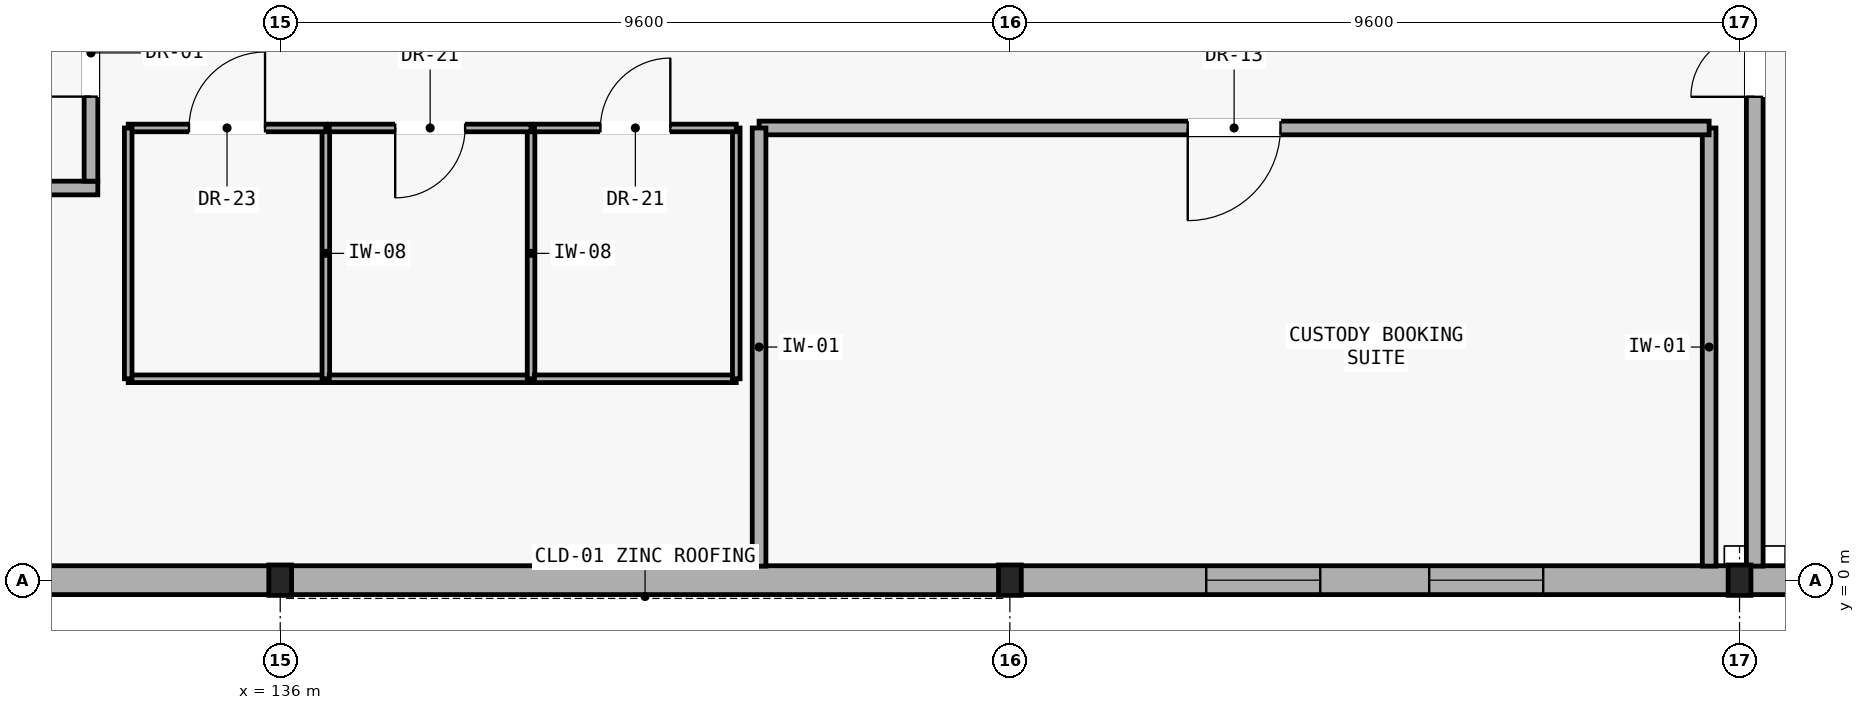
"""IFC4 building model, lengths in metres.
Left out: names, types, materials, properties, quantities, classifications, styles, units other than length and angle.
Written with IfcOpenShell. Run it as: python <this file> out.ifc"""

import sys

from ifc_helpers import new_model, si_unit, direction, frame, frame_2d, origin, origin_2d, place, context, subcontext, project, spatial, rectangle, i_section, extrude, element, fill, save


model = new_model("IFC4")
c1 = context("Model", 3, precision=1e-05, world=origin(), true_north=direction((0.0, 1.0)))
c2 = subcontext(c1, "Body", "Model", "MODEL_VIEW")
j1 = project(units=[si_unit("LENGTHUNIT", "METRE"), si_unit("PLANEANGLEUNIT", "RADIAN")], contexts=[c1])
p1 = place(None, origin())
s1 = spatial("IfcSite", under=j1, at=p1, CompositionType="ELEMENT")
p2 = place(p1, origin())
s2 = spatial("IfcBuilding", under=s1, at=p2, CompositionType="ELEMENT")
p3 = place(p2, origin())
s3 = spatial("IfcBuildingStorey", under=s2, at=p3, CompositionType="ELEMENT", Elevation=0.0)
for number, where, z_axis, x_axis in (
    (1, (136.0, 0.0, -0.27), (0.0, 0.0, 1.0), (1.0, 0.0, 0.0)),
    (2, (145.6, 0.0, -0.27), (0.0, 0.0, 1.0), (1.0, 0.0, 0.0)),
    (3, (155.2, 0.0, -0.27), (0.0, 0.0, 1.0), (1.0, 0.0, 0.0)),
):
    element("IfcColumn", number, at=place(p3, frame(where, z_axis=z_axis, x_axis=x_axis)), inside=s3, PredefinedType="COLUMN", context=c2, shape_type="SweptSolid", body=[
        extrude(i_section(OverallWidth=0.3, OverallDepth=0.4, WebThickness=0.013, FlangeThickness=0.024, FilletRadius=0.027, at=origin_2d()), origin(), (0.0, 0.0, 1.0), 5.52),
    ])
p4 = place(p3, frame((126.409, 0.0, 0.0), z_axis=(0.0, 0.0, 1.0), x_axis=(1.0, 0.0, 0.0)))
e4 = element("IfcWall", 4, at=p4, inside=s3, PredefinedType="SOLIDWALL", context=c2, shape_type="SweptSolid", body=[
    extrude(rectangle(XDim=9.583, YDim=0.38, at=frame_2d((4.791, 0.0))), origin(), (0.0, 0.0, 1.0), 4.67),
])
p5 = place(p4, frame((3.891, 0.0, 0.0)))
e5 = element("IfcOpeningElement", 5, at=p5, cuts=e4, PredefinedType="OPENING", context=c2, shape_type="SweptSolid", body=[
    extrude(rectangle(XDim=1.8, YDim=2.2, at=frame_2d((0.9, 1.1))), frame((0.0, 0.2, 0.0), z_axis=(0.0, -1.0, 0.0), x_axis=(1.0, 0.0, 0.0)), (0.0, 0.0, 1.0), 0.4),
])
p6 = place(p3, frame((136.009, 0.0, 0.0), z_axis=(0.0, 0.0, 1.0), x_axis=(1.0, 0.0, 0.0)))
e6 = element("IfcWall", 6, at=p6, inside=s3, PredefinedType="SOLIDWALL", context=c2, shape_type="SweptSolid", body=[
    extrude(rectangle(XDim=9.583, YDim=0.38, at=frame_2d((4.791, 0.0))), origin(), (0.0, 0.0, 1.0), 4.67),
])
p7 = place(p3, frame((145.609, 0.0, 0.0), z_axis=(0.0, 0.0, 1.0), x_axis=(1.0, 0.0, 0.0)))
e7 = element("IfcWall", 7, at=p7, inside=s3, PredefinedType="SOLIDWALL", context=c2, shape_type="SweptSolid", body=[
    extrude(rectangle(XDim=9.583, YDim=0.38, at=frame_2d((4.791, 0.0))), origin(), (0.0, 0.0, 1.0), 4.67),
])
p8 = place(p7, frame((2.575, 0.0, 1.7)))
e8 = element("IfcOpeningElement", 8, at=p8, cuts=e7, PredefinedType="OPENING", context=c2, shape_type="SweptSolid", body=[
    extrude(rectangle(XDim=1.5, YDim=0.7, at=frame_2d((0.75, 0.35))), frame((0.0, 0.2, 0.0), z_axis=(0.0, -1.0, 0.0), x_axis=(1.0, 0.0, 0.0)), (0.0, 0.0, 1.0), 0.4),
])
p9 = place(p7, frame((5.508, 0.0, 1.7)))
e9 = element("IfcOpeningElement", 9, at=p9, cuts=e7, PredefinedType="OPENING", context=c2, shape_type="SweptSolid", body=[
    extrude(rectangle(XDim=1.5, YDim=0.7, at=frame_2d((0.75, 0.35))), frame((0.0, 0.2, 0.0), z_axis=(0.0, -1.0, 0.0), x_axis=(1.0, 0.0, 0.0)), (0.0, 0.0, 1.0), 0.4),
])
p10 = place(p3, frame((155.209, 0.0, 0.0), z_axis=(0.0, 0.0, 1.0), x_axis=(1.0, 0.0, 0.0)))
e10 = element("IfcWall", 10, at=p10, inside=s3, PredefinedType="SOLIDWALL", context=c2, shape_type="SweptSolid", body=[
    extrude(rectangle(XDim=15.982, YDim=0.38, at=frame_2d((7.991, 0.0))), origin(), (0.0, 0.0, 1.0), 4.44),
])
p11 = place(p10, frame((5.591, 0.0, 0.0)))
e11 = element("IfcOpeningElement", 11, at=p11, cuts=e10, PredefinedType="OPENING", context=c2, shape_type="SweptSolid", body=[
    extrude(rectangle(XDim=4.8, YDim=3.1, at=frame_2d((2.4, 1.55))), frame((0.0, 0.2, 0.0), z_axis=(0.0, -1.0, 0.0), x_axis=(1.0, 0.0, 0.0)), (0.0, 0.0, 1.0), 0.4),
])
p12 = place(p3, frame((127.2, 5.16, 0.0), z_axis=(0.0, 0.0, 1.0), x_axis=(1.0, 0.0, 0.0)))
e12 = element("IfcWall", 12, at=p12, inside=s3, PredefinedType="PARTITIONING", context=c2, shape_type="SweptSolid", body=[
    extrude(rectangle(XDim=6.4, YDim=0.18, at=frame_2d((3.2, 0.0))), origin(), (0.0, 0.0, 1.0), 5.0),
])
p13 = place(p3, frame((133.51, 5.25, 0.0), z_axis=(0.0, 0.0, 1.0), x_axis=(0.0, 1.0, 0.0)))
e13 = element("IfcWall", 13, at=p13, inside=s3, PredefinedType="PARTITIONING", context=c2, shape_type="SweptSolid", body=[
    extrude(rectangle(XDim=3.375, YDim=0.18, at=frame_2d((1.688, 0.0))), origin(), (0.0, 0.0, 1.0), 5.0),
])
p14 = place(p13, frame((1.113, 0.0, 0.0)))
e14 = element("IfcOpeningElement", 14, at=p14, cuts=e13, PredefinedType="OPENING", context=c2, shape_type="SweptSolid", body=[
    extrude(rectangle(XDim=1.15, YDim=2.15, at=frame_2d((0.575, 1.075))), frame((0.0, 0.1, 0.0), z_axis=(0.0, -1.0, 0.0), x_axis=(1.0, 0.0, 0.0)), (0.0, 0.0, 1.0), 0.2),
])
p15 = place(p3, frame((155.4, 22.215, 0.0), z_axis=(0.0, 0.0, 1.0), x_axis=(0.0, -1.0, 0.0)))
e15 = element("IfcWall", 15, at=p15, inside=s3, PredefinedType="PARTITIONING", context=c2, shape_type="SweptSolid", body=[
    extrude(rectangle(XDim=22.03, YDim=0.22, at=frame_2d((11.015, 0.0))), origin(), (0.0, 0.0, 1.0), 4.54),
])
p16 = place(p15, frame((14.175, 0.0, 0.0)))
e16 = element("IfcOpeningElement", 16, at=p16, cuts=e15, PredefinedType="OPENING", context=c2, shape_type="SweptSolid", body=[
    extrude(rectangle(XDim=1.68, YDim=2.2, at=frame_2d((0.84, 1.1))), frame((0.0, 0.12, 0.0), z_axis=(0.0, -1.0, 0.0), x_axis=(1.0, 0.0, 0.0)), (0.0, 0.0, 1.0), 0.24),
])
p17 = place(p3, frame((154.8, 0.185, 0.0), z_axis=(0.0, 0.0, 1.0), x_axis=(0.0, 1.0, 0.0)))
e17 = element("IfcWall", 17, at=p17, inside=s3, PredefinedType="PARTITIONING", context=c2, shape_type="SweptSolid", body=[
    extrude(rectangle(XDim=5.765, YDim=0.18, at=frame_2d((2.882, 0.0))), origin(), (0.0, 0.0, 1.0), 5.0),
])
p18 = place(p3, frame((154.8, 5.95, 0.0), z_axis=(0.0, 0.0, 1.0), x_axis=(-1.0, 0.0, 0.0)))
e18 = element("IfcWall", 18, at=p18, inside=s3, PredefinedType="PARTITIONING", context=c2, shape_type="SweptSolid", body=[
    extrude(rectangle(XDim=12.5, YDim=0.18, at=frame_2d((6.25, 0.0))), origin(), (0.0, 0.0, 1.0), 5.0),
])
p19 = place(p18, frame((5.64, 0.0, 0.0)))
e19 = element("IfcOpeningElement", 19, at=p19, cuts=e18, PredefinedType="OPENING", context=c2, shape_type="SweptSolid", body=[
    extrude(rectangle(XDim=1.22, YDim=2.1, at=frame_2d((0.61, 1.05))), frame((0.0, 0.1, 0.0), z_axis=(0.0, -1.0, 0.0), x_axis=(1.0, 0.0, 0.0)), (0.0, 0.0, 1.0), 0.2),
])
p20 = place(p3, frame((142.3, 5.95, 0.0), z_axis=(0.0, 0.0, 1.0), x_axis=(0.0, -1.0, 0.0)))
e20 = element("IfcWall", 20, at=p20, inside=s3, PredefinedType="PARTITIONING", context=c2, shape_type="SweptSolid", body=[
    extrude(rectangle(XDim=5.765, YDim=0.18, at=frame_2d((2.882, 0.0))), origin(), (0.0, 0.0, 1.0), 5.0),
])
p21 = place(p3, frame((134.0, 2.65, 0.0), z_axis=(0.0, 0.0, 1.0), x_axis=(1.0, 0.0, 0.0)))
e21 = element("IfcWall", 21, at=p21, inside=s3, PredefinedType="PARTITIONING", context=c2, shape_type="SweptSolid", body=[
    extrude(rectangle(XDim=2.6, YDim=0.1, at=frame_2d((1.3, 0.0))), origin(), (0.0, 0.0, 1.0), 5.0),
])
p22 = place(p3, frame((136.6, 2.65, 0.0), z_axis=(0.0, 0.0, 1.0), x_axis=(0.0, 1.0, 0.0)))
e22 = element("IfcWall", 22, at=p22, inside=s3, PredefinedType="PARTITIONING", context=c2, shape_type="SweptSolid", body=[
    extrude(rectangle(XDim=3.3, YDim=0.1, at=frame_2d((1.65, 0.0))), origin(), (0.0, 0.0, 1.0), 5.0),
])
p23 = place(p3, frame((136.6, 5.95, 0.0), z_axis=(0.0, 0.0, 1.0), x_axis=(-1.0, 0.0, 0.0)))
e23 = element("IfcWall", 23, at=p23, inside=s3, PredefinedType="PARTITIONING", context=c2, shape_type="SweptSolid", body=[
    extrude(rectangle(XDim=2.6, YDim=0.1, at=frame_2d((1.3, 0.0))), origin(), (0.0, 0.0, 1.0), 5.0),
])
p24 = place(p23, frame((0.8, 0.0, 0.0)))
e24 = element("IfcOpeningElement", 24, at=p24, cuts=e23, PredefinedType="OPENING", context=c2, shape_type="SweptSolid", body=[
    extrude(rectangle(XDim=1.0, YDim=2.08, at=frame_2d((0.5, 1.04))), frame((0.0, 0.06, 0.0), z_axis=(0.0, -1.0, 0.0), x_axis=(1.0, 0.0, 0.0)), (0.0, 0.0, 1.0), 0.12),
])
p25 = place(p3, frame((134.0, 5.95, 0.0), z_axis=(0.0, 0.0, 1.0), x_axis=(0.0, -1.0, 0.0)))
e25 = element("IfcWall", 25, at=p25, inside=s3, PredefinedType="PARTITIONING", context=c2, shape_type="SweptSolid", body=[
    extrude(rectangle(XDim=3.3, YDim=0.1, at=frame_2d((1.65, 0.0))), origin(), (0.0, 0.0, 1.0), 5.0),
])
p26 = place(p3, frame((136.645, 2.65, 0.0), z_axis=(0.0, 0.0, 1.0), x_axis=(1.0, 0.0, 0.0)))
e26 = element("IfcWall", 26, at=p26, inside=s3, PredefinedType="PARTITIONING", context=c2, shape_type="SweptSolid", body=[
    extrude(rectangle(XDim=2.655, YDim=0.1, at=frame_2d((1.328, 0.0))), origin(), (0.0, 0.0, 1.0), 5.0),
])
p27 = place(p3, frame((139.3, 2.65, 0.0), z_axis=(0.0, 0.0, 1.0), x_axis=(0.0, 1.0, 0.0)))
e27 = element("IfcWall", 27, at=p27, inside=s3, PredefinedType="PARTITIONING", context=c2, shape_type="SweptSolid", body=[
    extrude(rectangle(XDim=3.3, YDim=0.1, at=frame_2d((1.65, 0.0))), origin(), (0.0, 0.0, 1.0), 5.0),
])
p28 = place(p3, frame((139.3, 5.95, 0.0), z_axis=(0.0, 0.0, 1.0), x_axis=(-1.0, 0.0, 0.0)))
e28 = element("IfcWall", 28, at=p28, inside=s3, PredefinedType="PARTITIONING", context=c2, shape_type="SweptSolid", body=[
    extrude(rectangle(XDim=2.655, YDim=0.1, at=frame_2d((1.328, 0.0))), origin(), (0.0, 0.0, 1.0), 5.0),
])
p29 = place(p28, frame((0.867, 0.0, 0.0)))
e29 = element("IfcOpeningElement", 29, at=p29, cuts=e28, PredefinedType="OPENING", context=c2, shape_type="SweptSolid", body=[
    extrude(rectangle(XDim=0.92, YDim=2.08, at=frame_2d((0.46, 1.04))), frame((0.0, 0.06, 0.0), z_axis=(0.0, -1.0, 0.0), x_axis=(1.0, 0.0, 0.0)), (0.0, 0.0, 1.0), 0.12),
])
p30 = place(p3, frame((139.345, 2.65, 0.0), z_axis=(0.0, 0.0, 1.0), x_axis=(1.0, 0.0, 0.0)))
e30 = element("IfcWall", 30, at=p30, inside=s3, PredefinedType="PARTITIONING", context=c2, shape_type="SweptSolid", body=[
    extrude(rectangle(XDim=2.655, YDim=0.1, at=frame_2d((1.328, 0.0))), origin(), (0.0, 0.0, 1.0), 5.0),
])
p31 = place(p3, frame((142.0, 2.65, 0.0), z_axis=(0.0, 0.0, 1.0), x_axis=(0.0, 1.0, 0.0)))
e31 = element("IfcWall", 31, at=p31, inside=s3, PredefinedType="PARTITIONING", context=c2, shape_type="SweptSolid", body=[
    extrude(rectangle(XDim=3.3, YDim=0.1, at=frame_2d((1.65, 0.0))), origin(), (0.0, 0.0, 1.0), 5.0),
])
p32 = place(p3, frame((142.0, 5.95, 0.0), z_axis=(0.0, 0.0, 1.0), x_axis=(-1.0, 0.0, 0.0)))
e32 = element("IfcWall", 32, at=p32, inside=s3, PredefinedType="PARTITIONING", context=c2, shape_type="SweptSolid", body=[
    extrude(rectangle(XDim=2.655, YDim=0.1, at=frame_2d((1.328, 0.0))), origin(), (0.0, 0.0, 1.0), 5.0),
])
p33 = place(p32, frame((0.867, 0.0, 0.0)))
e33 = element("IfcOpeningElement", 33, at=p33, cuts=e32, PredefinedType="OPENING", context=c2, shape_type="SweptSolid", body=[
    extrude(rectangle(XDim=0.92, YDim=2.08, at=frame_2d((0.46, 1.04))), frame((0.0, 0.06, 0.0), z_axis=(0.0, -1.0, 0.0), x_axis=(1.0, 0.0, 0.0)), (0.0, 0.0, 1.0), 0.12),
])
p34 = place(p8, origin())
e34 = element("IfcWindow", 34, at=p34, inside=s3, PartitioningType="SINGLE_PANEL", PredefinedType="WINDOW", context=c2, shape_type="SweptSolid", body=[
    extrude(rectangle(XDim=1.5, YDim=0.7, at=frame_2d((0.75, 0.35))), frame((0.0, 0.03, 0.0), z_axis=(0.0, -1.0, 0.0), x_axis=(1.0, 0.0, 0.0)), (0.0, 0.0, 1.0), 0.06),
])
fill(e8, e34)
p35 = place(p9, origin())
e35 = element("IfcWindow", 35, at=p35, inside=s3, PartitioningType="SINGLE_PANEL", PredefinedType="WINDOW", context=c2, shape_type="SweptSolid", body=[
    extrude(rectangle(XDim=1.5, YDim=0.7, at=frame_2d((0.75, 0.35))), frame((0.0, 0.03, 0.0), z_axis=(0.0, -1.0, 0.0), x_axis=(1.0, 0.0, 0.0)), (0.0, 0.0, 1.0), 0.06),
])
fill(e9, e35)
p36 = place(p14, origin())
e36 = element("IfcDoor", 36, at=p36, inside=s3, OperationType="SINGLE_SWING_LEFT", PredefinedType="DOOR", context=c2, shape_type="SweptSolid", body=[
    extrude(rectangle(XDim=1.15, YDim=2.15, at=frame_2d((0.575, 1.075))), frame((0.0, 0.025, 0.0), z_axis=(0.0, -1.0, 0.0), x_axis=(1.0, 0.0, 0.0)), (0.0, 0.0, 1.0), 0.05),
])
fill(e14, e36)
p37 = place(p16, frame((1.68, 0.0, 0.0), z_axis=(0.0, 0.0, 1.0), x_axis=(-1.0, 0.0, 0.0)))
e37 = element("IfcDoor", 37, at=p37, inside=s3, OperationType="DOUBLE_DOOR_SINGLE_SWING", PredefinedType="DOOR", context=c2, shape_type="SweptSolid", body=[
    extrude(rectangle(XDim=1.68, YDim=2.2, at=frame_2d((0.84, 1.1))), frame((0.0, 0.025, 0.0), z_axis=(0.0, -1.0, 0.0), x_axis=(1.0, 0.0, 0.0)), (0.0, 0.0, 1.0), 0.05),
])
fill(e16, e37)
p38 = place(p19, origin())
e38 = element("IfcDoor", 38, at=p38, inside=s3, OperationType="SINGLE_SWING_RIGHT", PredefinedType="DOOR", context=c2, shape_type="SweptSolid", body=[
    extrude(rectangle(XDim=1.22, YDim=2.1, at=frame_2d((0.61, 1.05))), frame((0.0, 0.025, 0.0), z_axis=(0.0, -1.0, 0.0), x_axis=(1.0, 0.0, 0.0)), (0.0, 0.0, 1.0), 0.05),
])
fill(e19, e38)
p39 = place(p24, frame((1.0, 0.0, 0.0), z_axis=(0.0, 0.0, 1.0), x_axis=(-1.0, 0.0, 0.0)))
e39 = element("IfcDoor", 39, at=p39, inside=s3, OperationType="SINGLE_SWING_LEFT", PredefinedType="DOOR", context=c2, shape_type="SweptSolid", body=[
    extrude(rectangle(XDim=1.0, YDim=2.08, at=frame_2d((0.5, 1.04))), frame((0.0, 0.025, 0.0), z_axis=(0.0, -1.0, 0.0), x_axis=(1.0, 0.0, 0.0)), (0.0, 0.0, 1.0), 0.05),
])
fill(e24, e39)
p40 = place(p29, origin())
e40 = element("IfcDoor", 40, at=p40, inside=s3, OperationType="SINGLE_SWING_RIGHT", PredefinedType="DOOR", context=c2, shape_type="SweptSolid", body=[
    extrude(rectangle(XDim=0.92, YDim=2.08, at=frame_2d((0.46, 1.04))), frame((0.0, 0.025, 0.0), z_axis=(0.0, -1.0, 0.0), x_axis=(1.0, 0.0, 0.0)), (0.0, 0.0, 1.0), 0.05),
])
fill(e29, e40)
p41 = place(p33, frame((0.92, 0.0, 0.0), z_axis=(0.0, 0.0, 1.0), x_axis=(-1.0, 0.0, 0.0)))
e41 = element("IfcDoor", 41, at=p41, inside=s3, OperationType="SINGLE_SWING_LEFT", PredefinedType="DOOR", context=c2, shape_type="SweptSolid", body=[
    extrude(rectangle(XDim=0.92, YDim=2.08, at=frame_2d((0.46, 1.04))), frame((0.0, 0.025, 0.0), z_axis=(0.0, -1.0, 0.0), x_axis=(1.0, 0.0, 0.0)), (0.0, 0.0, 1.0), 0.05),
])
fill(e33, e41)
save(model, sys.argv[1])
